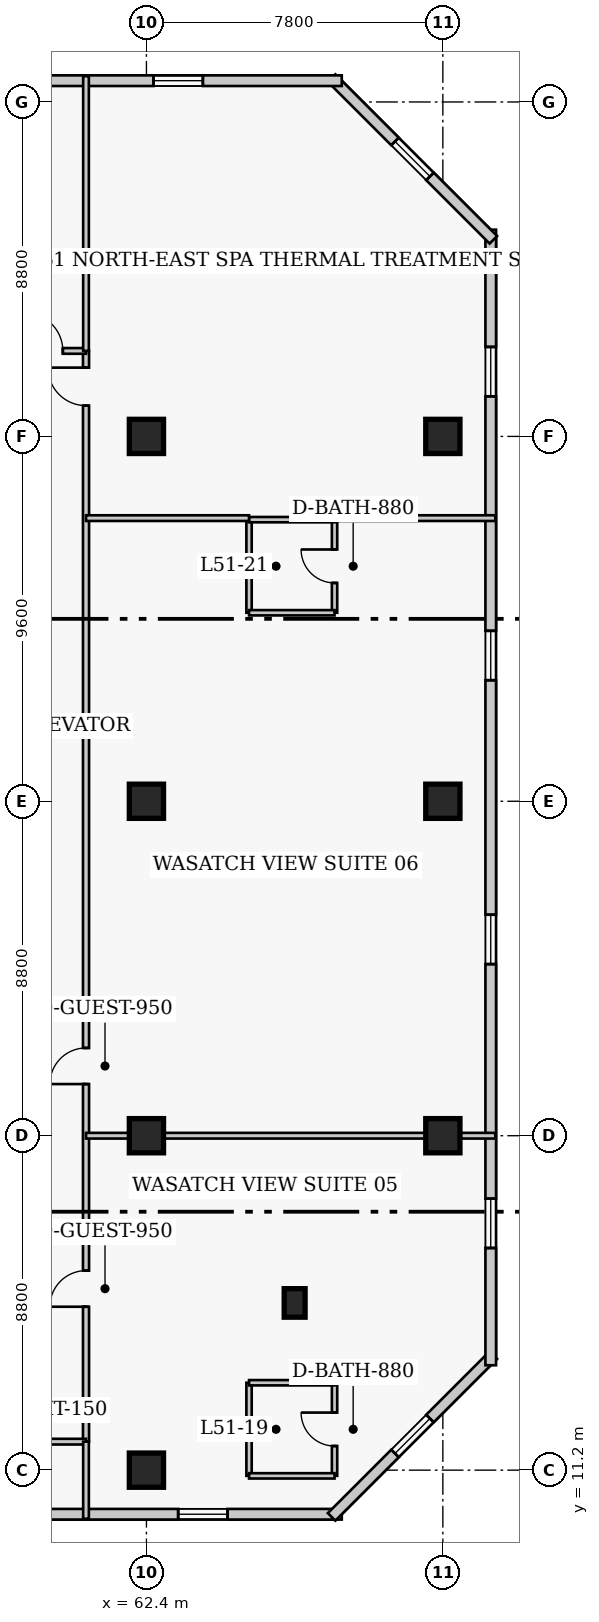
"""IFC4 building model, lengths in metres.
Left out: names, types, materials, properties, quantities, classifications, styles, units other than length and angle.
Written with IfcOpenShell. Run it as: python <this file> out.ifc"""

import sys

from ifc_helpers import new_model, si_unit, direction, frame, frame_2d, origin, origin_2d, place, context, subcontext, project, spatial, rectangle, extrude, element, fill, save


model = new_model("IFC4")
c1 = context("Model", 3, precision=1e-05, world=origin(), true_north=direction((0.0, 1.0)))
c2 = subcontext(c1, "Body", "Model", "MODEL_VIEW")
j1 = project(units=[si_unit("LENGTHUNIT", "METRE"), si_unit("PLANEANGLEUNIT", "RADIAN")], contexts=[c1])
p1 = place(None, origin())
s1 = spatial("IfcSite", under=j1, at=p1, CompositionType="ELEMENT")
p2 = place(p1, origin())
s2 = spatial("IfcBuilding", under=s1, at=p2, CompositionType="ELEMENT")
p3 = place(p2, frame((0.0, 0.0, 204.6)))
s3 = spatial("IfcBuildingStorey", under=s2, at=p3, CompositionType="ELEMENT", Elevation=204.6)
for number, where, z_axis, x_axis in (
    (1, (62.4, 11.2, 0.0), (0.0, 0.0, 1.0), (1.0, 0.0, 0.0)),
    (2, (62.4, 20.0, 0.0), (0.0, 0.0, 1.0), (1.0, 0.0, 0.0)),
    (3, (62.4, 28.8, 0.0), (0.0, 0.0, 1.0), (1.0, 0.0, 0.0)),
    (4, (62.4, 38.4, 0.0), (0.0, 0.0, 1.0), (1.0, 0.0, 0.0)),
    (5, (70.2, 20.0, 0.0), (0.0, 0.0, 1.0), (1.0, 0.0, 0.0)),
    (6, (70.2, 28.8, 0.0), (0.0, 0.0, 1.0), (1.0, 0.0, 0.0)),
    (7, (70.2, 38.4, 0.0), (0.0, 0.0, 1.0), (1.0, 0.0, 0.0)),
):
    element("IfcColumn", number, at=place(p3, frame(where, z_axis=z_axis, x_axis=x_axis)), inside=s3, PredefinedType="COLUMN", context=c2, shape_type="SweptSolid", body=[
        extrude(rectangle(XDim=0.9, YDim=0.9, at=origin_2d()), origin(), (0.0, 0.0, 1.0), 3.9),
    ])
p4 = place(p3, frame((66.3, 15.6, 0.0), z_axis=(0.0, 0.0, 1.0), x_axis=(1.0, 0.0, 0.0)))
e8 = element("IfcColumn", 8, at=p4, inside=s3, PredefinedType="PILASTER", context=c2, shape_type="SweptSolid", body=[
    extrude(rectangle(XDim=0.55, YDim=0.75, at=origin_2d()), origin(), (0.0, 0.0, 1.0), 3.9),
])
p5 = place(p3, frame((41.71, 10.04, 0.0), z_axis=(0.0, 0.0, 1.0), x_axis=(1.0, 0.0, 0.0)))
e9 = element("IfcWall", 9, at=p5, inside=s3, PredefinedType="SOLIDWALL", context=c2, shape_type="SweptSolid", body=[
    extrude(rectangle(XDim=25.83, YDim=0.28, at=frame_2d((12.915, 0.0))), origin(), (0.0, 0.0, 1.0), 3.65),
])
p6 = place(p5, frame((3.005, 0.0, 0.85)))
e10 = element("IfcOpeningElement", 10, at=p6, cuts=e9, PredefinedType="OPENING", context=c2, shape_type="SweptSolid", body=[
    extrude(rectangle(XDim=1.3, YDim=1.7, at=frame_2d((0.65, 0.85))), frame((0.0, 0.15, 0.0), z_axis=(0.0, -1.0, 0.0), x_axis=(1.0, 0.0, 0.0)), (0.0, 0.0, 1.0), 0.3),
])
p7 = place(p5, frame((13.415, 0.0, 0.85)))
e11 = element("IfcOpeningElement", 11, at=p7, cuts=e9, PredefinedType="OPENING", context=c2, shape_type="SweptSolid", body=[
    extrude(rectangle(XDim=1.3, YDim=1.7, at=frame_2d((0.65, 0.85))), frame((0.0, 0.15, 0.0), z_axis=(0.0, -1.0, 0.0), x_axis=(1.0, 0.0, 0.0)), (0.0, 0.0, 1.0), 0.3),
])
p8 = place(p5, frame((21.525, 0.0, 0.85)))
e12 = element("IfcOpeningElement", 12, at=p8, cuts=e9, PredefinedType="OPENING", context=c2, shape_type="SweptSolid", body=[
    extrude(rectangle(XDim=1.3, YDim=1.7, at=frame_2d((0.65, 0.85))), frame((0.0, 0.15, 0.0), z_axis=(0.0, -1.0, 0.0), x_axis=(1.0, 0.0, 0.0)), (0.0, 0.0, 1.0), 0.3),
])
p9 = place(p3, frame((67.273, 9.971, 0.0), z_axis=(0.0, 0.0, 1.0), x_axis=(0.707106781187, 0.707106781187, 0.0)))
e13 = element("IfcWall", 13, at=p9, inside=s3, PredefinedType="SOLIDWALL", context=c2, shape_type="SweptSolid", body=[
    extrude(rectangle(XDim=6.02, YDim=0.28, at=frame_2d((3.01, 0.0))), origin(), (0.0, 0.0, 1.0), 3.65),
])
p10 = place(p9, frame((2.36, 0.0, 0.85)))
e14 = element("IfcOpeningElement", 14, at=p10, cuts=e13, PredefinedType="OPENING", context=c2, shape_type="SweptSolid", body=[
    extrude(rectangle(XDim=1.3, YDim=1.7, at=frame_2d((0.65, 0.85))), frame((0.0, 0.15, 0.0), z_axis=(0.0, -1.0, 0.0), x_axis=(1.0, 0.0, 0.0)), (0.0, 0.0, 1.0), 0.3),
])
p11 = place(p3, frame((71.46, 13.96, 0.0), z_axis=(0.0, 0.0, 1.0), x_axis=(0.0, 1.0, 0.0)))
e15 = element("IfcWall", 15, at=p11, inside=s3, PredefinedType="SOLIDWALL", context=c2, shape_type="SweptSolid", body=[
    extrude(rectangle(XDim=29.88, YDim=0.28, at=frame_2d((14.94, 0.0))), origin(), (0.0, 0.0, 1.0), 3.65),
])
p12 = place(p11, frame((3.085, 0.0, 0.85)))
e16 = element("IfcOpeningElement", 16, at=p12, cuts=e15, PredefinedType="OPENING", context=c2, shape_type="SweptSolid", body=[
    extrude(rectangle(XDim=1.3, YDim=1.7, at=frame_2d((0.65, 0.85))), frame((0.0, 0.15, 0.0), z_axis=(0.0, -1.0, 0.0), x_axis=(1.0, 0.0, 0.0)), (0.0, 0.0, 1.0), 0.3),
])
p13 = place(p11, frame((10.555, 0.0, 0.85)))
e17 = element("IfcOpeningElement", 17, at=p13, cuts=e15, PredefinedType="OPENING", context=c2, shape_type="SweptSolid", body=[
    extrude(rectangle(XDim=1.3, YDim=1.7, at=frame_2d((0.65, 0.85))), frame((0.0, 0.15, 0.0), z_axis=(0.0, -1.0, 0.0), x_axis=(1.0, 0.0, 0.0)), (0.0, 0.0, 1.0), 0.3),
])
p14 = place(p11, frame((18.025, 0.0, 0.85)))
e18 = element("IfcOpeningElement", 18, at=p14, cuts=e15, PredefinedType="OPENING", context=c2, shape_type="SweptSolid", body=[
    extrude(rectangle(XDim=1.3, YDim=1.7, at=frame_2d((0.65, 0.85))), frame((0.0, 0.15, 0.0), z_axis=(0.0, -1.0, 0.0), x_axis=(1.0, 0.0, 0.0)), (0.0, 0.0, 1.0), 0.3),
])
p15 = place(p11, frame((25.495, 0.0, 0.85)))
e19 = element("IfcOpeningElement", 19, at=p15, cuts=e15, PredefinedType="OPENING", context=c2, shape_type="SweptSolid", body=[
    extrude(rectangle(XDim=1.3, YDim=1.7, at=frame_2d((0.65, 0.85))), frame((0.0, 0.15, 0.0), z_axis=(0.0, -1.0, 0.0), x_axis=(1.0, 0.0, 0.0)), (0.0, 0.0, 1.0), 0.3),
])
p16 = place(p3, frame((71.529, 43.573, 0.0), z_axis=(0.0, 0.0, 1.0), x_axis=(-0.707106781187, 0.707106781187, 0.0)))
e20 = element("IfcWall", 20, at=p16, inside=s3, PredefinedType="SOLIDWALL", context=c2, shape_type="SweptSolid", body=[
    extrude(rectangle(XDim=6.02, YDim=0.28, at=frame_2d((3.01, 0.0))), origin(), (0.0, 0.0, 1.0), 3.65),
])
p17 = place(p16, frame((2.36, 0.0, 0.85)))
e21 = element("IfcOpeningElement", 21, at=p17, cuts=e20, PredefinedType="OPENING", context=c2, shape_type="SweptSolid", body=[
    extrude(rectangle(XDim=1.3, YDim=1.7, at=frame_2d((0.65, 0.85))), frame((0.0, 0.15, 0.0), z_axis=(0.0, -1.0, 0.0), x_axis=(1.0, 0.0, 0.0)), (0.0, 0.0, 1.0), 0.3),
])
p18 = place(p3, frame((67.54, 47.76, 0.0), z_axis=(0.0, 0.0, 1.0), x_axis=(-1.0, 0.0, 0.0)))
e22 = element("IfcWall", 22, at=p18, inside=s3, PredefinedType="SOLIDWALL", context=c2, shape_type="SweptSolid", body=[
    extrude(rectangle(XDim=25.83, YDim=0.28, at=frame_2d((12.915, 0.0))), origin(), (0.0, 0.0, 1.0), 3.65),
])
p19 = place(p18, frame((3.655, 0.0, 0.85)))
e23 = element("IfcOpeningElement", 23, at=p19, cuts=e22, PredefinedType="OPENING", context=c2, shape_type="SweptSolid", body=[
    extrude(rectangle(XDim=1.3, YDim=1.7, at=frame_2d((0.65, 0.85))), frame((0.0, 0.15, 0.0), z_axis=(0.0, -1.0, 0.0), x_axis=(1.0, 0.0, 0.0)), (0.0, 0.0, 1.0), 0.3),
])
p20 = place(p18, frame((22.025, 0.0, 0.85)))
e24 = element("IfcOpeningElement", 24, at=p20, cuts=e22, PredefinedType="OPENING", context=c2, shape_type="SweptSolid", body=[
    extrude(rectangle(XDim=1.3, YDim=1.7, at=frame_2d((0.65, 0.85))), frame((0.0, 0.15, 0.0), z_axis=(0.0, -1.0, 0.0), x_axis=(1.0, 0.0, 0.0)), (0.0, 0.0, 1.0), 0.3),
])
p21 = place(p3, frame((60.81, 11.95, 0.0), z_axis=(0.0, 0.0, 1.0), x_axis=(0.0, 1.0, 0.0)))
e25 = element("IfcWall", 25, at=p21, inside=s3, PredefinedType="PARTITIONING", context=c2, shape_type="SweptSolid", body=[
    extrude(rectangle(XDim=28.7, YDim=0.16, at=frame_2d((14.35, 0.0))), origin(), (0.0, 0.0, 1.0), 3.65),
])
p22 = place(p21, frame((3.55, 0.0, 0.0)))
e26 = element("IfcOpeningElement", 26, at=p22, cuts=e25, PredefinedType="OPENING", context=c2, shape_type="SweptSolid", body=[
    extrude(rectangle(XDim=0.95, YDim=2.1, at=frame_2d((0.475, 1.05))), frame((0.0, 0.09, 0.0), z_axis=(0.0, -1.0, 0.0), x_axis=(1.0, 0.0, 0.0)), (0.0, 0.0, 1.0), 0.18),
])
p23 = place(p21, frame((9.409, 0.0, 0.0)))
e27 = element("IfcOpeningElement", 27, at=p23, cuts=e25, PredefinedType="OPENING", context=c2, shape_type="SweptSolid", body=[
    extrude(rectangle(XDim=0.95, YDim=2.1, at=frame_2d((0.475, 1.05))), frame((0.0, 0.09, 0.0), z_axis=(0.0, -1.0, 0.0), x_axis=(1.0, 0.0, 0.0)), (0.0, 0.0, 1.0), 0.18),
])
p24 = place(p21, frame((27.26, 0.0, 0.0)))
e28 = element("IfcOpeningElement", 28, at=p24, cuts=e25, PredefinedType="OPENING", context=c2, shape_type="SweptSolid", body=[
    extrude(rectangle(XDim=1.0, YDim=2.15, at=frame_2d((0.5, 1.075))), frame((0.0, 0.09, 0.0), z_axis=(0.0, -1.0, 0.0), x_axis=(1.0, 0.0, 0.0)), (0.0, 0.0, 1.0), 0.18),
])
p25 = place(p3, frame((58.59, 11.95, 0.0), z_axis=(0.0, 0.0, 1.0), x_axis=(1.0, 0.0, 0.0)))
e29 = element("IfcWall", 29, at=p25, inside=s3, PredefinedType="PARTITIONING", context=c2, shape_type="SweptSolid", body=[
    extrude(rectangle(XDim=2.22, YDim=0.15, at=frame_2d((1.11, 0.0))), origin(), (0.0, 0.0, 1.0), 3.65),
])
p26 = place(p3, frame((56.8, 40.65, 0.0), z_axis=(0.0, 0.0, 1.0), x_axis=(1.0, 0.0, 0.0)))
e30 = element("IfcWall", 30, at=p26, inside=s3, PredefinedType="PARTITIONING", context=c2, shape_type="SweptSolid", body=[
    extrude(rectangle(XDim=4.01, YDim=0.15, at=frame_2d((2.005, 0.0))), origin(), (0.0, 0.0, 1.0), 3.65),
])
p27 = place(p26, frame((2.4, 0.0, 0.0)))
e31 = element("IfcOpeningElement", 31, at=p27, cuts=e30, PredefinedType="OPENING", context=c2, shape_type="SweptSolid", body=[
    extrude(rectangle(XDim=1.0, YDim=2.15, at=frame_2d((0.5, 1.075))), frame((0.0, 0.085, 0.0), z_axis=(0.0, -1.0, 0.0), x_axis=(1.0, 0.0, 0.0)), (0.0, 0.0, 1.0), 0.17),
])
p28 = place(p3, frame((60.81, 40.65, 0.0), z_axis=(0.0, 0.0, 1.0), x_axis=(0.0, 1.0, 0.0)))
e32 = element("IfcWall", 32, at=p28, inside=s3, PredefinedType="PARTITIONING", context=c2, shape_type="SweptSolid", body=[
    extrude(rectangle(XDim=7.23, YDim=0.15, at=frame_2d((3.615, 0.0))), origin(), (0.0, 0.0, 1.0), 3.65),
])
p29 = place(p3, frame((60.81, 9.92, 0.0), z_axis=(0.0, 0.0, 1.0), x_axis=(0.0, 1.0, 0.0)))
e33 = element("IfcWall", 33, at=p29, inside=s3, PredefinedType="PARTITIONING", context=c2, shape_type="SweptSolid", body=[
    extrude(rectangle(XDim=2.03, YDim=0.15, at=frame_2d((1.015, 0.0))), origin(), (0.0, 0.0, 1.0), 3.65),
])
p30 = place(p3, frame((65.1, 11.05, 0.0), z_axis=(0.0, 0.0, 1.0), x_axis=(0.0, 1.0, 0.0)))
e34 = element("IfcWall", 34, at=p30, inside=s3, PredefinedType="PLUMBINGWALL", context=c2, shape_type="SweptSolid", body=[
    extrude(rectangle(XDim=2.45, YDim=0.14, at=frame_2d((1.225, 0.0))), origin(), (0.0, 0.0, 1.0), 3.65),
])
p31 = place(p3, frame((67.35, 11.05, 0.0), z_axis=(0.0, 0.0, 1.0), x_axis=(0.0, 1.0, 0.0)))
e35 = element("IfcWall", 35, at=p31, inside=s3, PredefinedType="PLUMBINGWALL", context=c2, shape_type="SweptSolid", body=[
    extrude(rectangle(XDim=2.45, YDim=0.14, at=frame_2d((1.225, 0.0))), origin(), (0.0, 0.0, 1.0), 3.65),
])
p32 = place(p31, frame((0.785, 0.0, 0.0)))
e36 = element("IfcOpeningElement", 36, at=p32, cuts=e35, PredefinedType="OPENING", context=c2, shape_type="SweptSolid", body=[
    extrude(rectangle(XDim=0.88, YDim=2.05, at=frame_2d((0.44, 1.025))), frame((0.0, 0.08, 0.0), z_axis=(0.0, -1.0, 0.0), x_axis=(1.0, 0.0, 0.0)), (0.0, 0.0, 1.0), 0.16),
])
for number, where, z_axis, x_axis in (
    (37, (65.1, 11.05, 0.0), (0.0, 0.0, 1.0), (1.0, 0.0, 0.0)),
    (38, (65.1, 13.5, 0.0), (0.0, 0.0, 1.0), (1.0, 0.0, 0.0)),
):
    element("IfcWall", number, at=place(p3, frame(where, z_axis=z_axis, x_axis=x_axis)), inside=s3, PredefinedType="PLUMBINGWALL", context=c2, shape_type="SweptSolid", body=[
        extrude(rectangle(XDim=2.25, YDim=0.14, at=frame_2d((1.125, 0.0))), origin(), (0.0, 0.0, 1.0), 3.65),
    ])
p33 = place(p3, frame((60.81, 20.0, 0.0), z_axis=(0.0, 0.0, 1.0), x_axis=(1.0, 0.0, 0.0)))
e39 = element("IfcWall", 39, at=p33, inside=s3, PredefinedType="PARTITIONING", context=c2, shape_type="SweptSolid", body=[
    extrude(rectangle(XDim=10.77, YDim=0.15, at=frame_2d((5.385, 0.0))), origin(), (0.0, 0.0, 1.0), 2.878),
])
p34 = place(p3, frame((65.1, 33.76, 0.0), z_axis=(0.0, 0.0, 1.0), x_axis=(0.0, 1.0, 0.0)))
e40 = element("IfcWall", 40, at=p34, inside=s3, PredefinedType="PLUMBINGWALL", context=c2, shape_type="SweptSolid", body=[
    extrude(rectangle(XDim=2.45, YDim=0.14, at=frame_2d((1.225, 0.0))), origin(), (0.0, 0.0, 1.0), 3.65),
])
p35 = place(p3, frame((67.35, 33.76, 0.0), z_axis=(0.0, 0.0, 1.0), x_axis=(0.0, 1.0, 0.0)))
e41 = element("IfcWall", 41, at=p35, inside=s3, PredefinedType="PLUMBINGWALL", context=c2, shape_type="SweptSolid", body=[
    extrude(rectangle(XDim=2.45, YDim=0.14, at=frame_2d((1.225, 0.0))), origin(), (0.0, 0.0, 1.0), 3.65),
])
p36 = place(p35, frame((0.785, 0.0, 0.0)))
e42 = element("IfcOpeningElement", 42, at=p36, cuts=e41, PredefinedType="OPENING", context=c2, shape_type="SweptSolid", body=[
    extrude(rectangle(XDim=0.88, YDim=2.05, at=frame_2d((0.44, 1.025))), frame((0.0, 0.08, 0.0), z_axis=(0.0, -1.0, 0.0), x_axis=(1.0, 0.0, 0.0)), (0.0, 0.0, 1.0), 0.16),
])
for number, where, z_axis, x_axis in (
    (43, (65.1, 33.76, 0.0), (0.0, 0.0, 1.0), (1.0, 0.0, 0.0)),
    (44, (65.1, 36.21, 0.0), (0.0, 0.0, 1.0), (1.0, 0.0, 0.0)),
):
    element("IfcWall", number, at=place(p3, frame(where, z_axis=z_axis, x_axis=x_axis)), inside=s3, PredefinedType="PLUMBINGWALL", context=c2, shape_type="SweptSolid", body=[
        extrude(rectangle(XDim=2.25, YDim=0.14, at=frame_2d((1.125, 0.0))), origin(), (0.0, 0.0, 1.0), 3.65),
    ])
p37 = place(p3, frame((60.81, 36.25, 0.0), z_axis=(0.0, 0.0, 1.0), x_axis=(1.0, 0.0, 0.0)))
e45 = element("IfcWall", 45, at=p37, inside=s3, PredefinedType="PARTITIONING", context=c2, shape_type="SweptSolid", body=[
    extrude(rectangle(XDim=4.29, YDim=0.15, at=frame_2d((2.145, 0.0))), origin(), (0.0, 0.0, 1.0), 3.65),
])
p38 = place(p3, frame((67.35, 36.25, 0.0), z_axis=(0.0, 0.0, 1.0), x_axis=(1.0, 0.0, 0.0)))
e46 = element("IfcWall", 46, at=p38, inside=s3, PredefinedType="PARTITIONING", context=c2, shape_type="SweptSolid", body=[
    extrude(rectangle(XDim=4.23, YDim=0.15, at=frame_2d((2.115, 0.0))), origin(), (0.0, 0.0, 1.0), 3.65),
])
p39 = place(p8, origin())
e47 = element("IfcWindow", 47, at=p39, inside=s3, PartitioningType="SINGLE_PANEL", PredefinedType="WINDOW", context=c2, shape_type="SweptSolid", body=[
    extrude(rectangle(XDim=1.3, YDim=1.7, at=frame_2d((0.65, 0.85))), frame((0.0, 0.03, 0.0), z_axis=(0.0, -1.0, 0.0), x_axis=(1.0, 0.0, 0.0)), (0.0, 0.0, 1.0), 0.06),
])
fill(e12, e47)
p40 = place(p10, origin())
e48 = element("IfcWindow", 48, at=p40, inside=s3, PartitioningType="SINGLE_PANEL", PredefinedType="WINDOW", context=c2, shape_type="SweptSolid", body=[
    extrude(rectangle(XDim=1.3, YDim=1.7, at=frame_2d((0.65, 0.85))), frame((0.0, 0.03, 0.0), z_axis=(0.0, -1.0, 0.0), x_axis=(1.0, 0.0, 0.0)), (0.0, 0.0, 1.0), 0.06),
])
fill(e14, e48)
p41 = place(p12, origin())
e49 = element("IfcWindow", 49, at=p41, inside=s3, PartitioningType="SINGLE_PANEL", PredefinedType="WINDOW", context=c2, shape_type="SweptSolid", body=[
    extrude(rectangle(XDim=1.3, YDim=1.7, at=frame_2d((0.65, 0.85))), frame((0.0, 0.03, 0.0), z_axis=(0.0, -1.0, 0.0), x_axis=(1.0, 0.0, 0.0)), (0.0, 0.0, 1.0), 0.06),
])
fill(e16, e49)
p42 = place(p13, origin())
e50 = element("IfcWindow", 50, at=p42, inside=s3, PartitioningType="SINGLE_PANEL", PredefinedType="WINDOW", context=c2, shape_type="SweptSolid", body=[
    extrude(rectangle(XDim=1.3, YDim=1.7, at=frame_2d((0.65, 0.85))), frame((0.0, 0.03, 0.0), z_axis=(0.0, -1.0, 0.0), x_axis=(1.0, 0.0, 0.0)), (0.0, 0.0, 1.0), 0.06),
])
fill(e17, e50)
p43 = place(p14, origin())
e51 = element("IfcWindow", 51, at=p43, inside=s3, PartitioningType="SINGLE_PANEL", PredefinedType="WINDOW", context=c2, shape_type="SweptSolid", body=[
    extrude(rectangle(XDim=1.3, YDim=1.7, at=frame_2d((0.65, 0.85))), frame((0.0, 0.03, 0.0), z_axis=(0.0, -1.0, 0.0), x_axis=(1.0, 0.0, 0.0)), (0.0, 0.0, 1.0), 0.06),
])
fill(e18, e51)
p44 = place(p15, origin())
e52 = element("IfcWindow", 52, at=p44, inside=s3, PartitioningType="SINGLE_PANEL", PredefinedType="WINDOW", context=c2, shape_type="SweptSolid", body=[
    extrude(rectangle(XDim=1.3, YDim=1.7, at=frame_2d((0.65, 0.85))), frame((0.0, 0.03, 0.0), z_axis=(0.0, -1.0, 0.0), x_axis=(1.0, 0.0, 0.0)), (0.0, 0.0, 1.0), 0.06),
])
fill(e19, e52)
p45 = place(p17, origin())
e53 = element("IfcWindow", 53, at=p45, inside=s3, PartitioningType="SINGLE_PANEL", PredefinedType="WINDOW", context=c2, shape_type="SweptSolid", body=[
    extrude(rectangle(XDim=1.3, YDim=1.7, at=frame_2d((0.65, 0.85))), frame((0.0, 0.03, 0.0), z_axis=(0.0, -1.0, 0.0), x_axis=(1.0, 0.0, 0.0)), (0.0, 0.0, 1.0), 0.06),
])
fill(e21, e53)
p46 = place(p19, origin())
e54 = element("IfcWindow", 54, at=p46, inside=s3, PartitioningType="SINGLE_PANEL", PredefinedType="WINDOW", context=c2, shape_type="SweptSolid", body=[
    extrude(rectangle(XDim=1.3, YDim=1.7, at=frame_2d((0.65, 0.85))), frame((0.0, 0.03, 0.0), z_axis=(0.0, -1.0, 0.0), x_axis=(1.0, 0.0, 0.0)), (0.0, 0.0, 1.0), 0.06),
])
fill(e23, e54)
p47 = place(p27, origin())
e55 = element("IfcDoor", 55, at=p47, inside=s3, OperationType="SINGLE_SWING_LEFT", PredefinedType="DOOR", context=c2, shape_type="SweptSolid", body=[
    extrude(rectangle(XDim=1.0, YDim=2.15, at=frame_2d((0.5, 1.075))), frame((0.0, 0.025, 0.0), z_axis=(0.0, -1.0, 0.0), x_axis=(1.0, 0.0, 0.0)), (0.0, 0.0, 1.0), 0.05),
])
fill(e31, e55)
p48 = place(p32, origin())
e56 = element("IfcDoor", 56, at=p48, inside=s3, OperationType="SINGLE_SWING_RIGHT", PredefinedType="DOOR", context=c2, shape_type="SweptSolid", body=[
    extrude(rectangle(XDim=0.88, YDim=2.05, at=frame_2d((0.44, 1.025))), frame((0.0, 0.025, 0.0), z_axis=(0.0, -1.0, 0.0), x_axis=(1.0, 0.0, 0.0)), (0.0, 0.0, 1.0), 0.05),
])
fill(e36, e56)
p49 = place(p22, origin())
e57 = element("IfcDoor", 57, at=p49, inside=s3, OperationType="SINGLE_SWING_LEFT", PredefinedType="DOOR", context=c2, shape_type="SweptSolid", body=[
    extrude(rectangle(XDim=0.95, YDim=2.1, at=frame_2d((0.475, 1.05))), frame((0.0, 0.025, 0.0), z_axis=(0.0, -1.0, 0.0), x_axis=(1.0, 0.0, 0.0)), (0.0, 0.0, 1.0), 0.05),
])
fill(e26, e57)
p50 = place(p36, origin())
e58 = element("IfcDoor", 58, at=p50, inside=s3, OperationType="SINGLE_SWING_RIGHT", PredefinedType="DOOR", context=c2, shape_type="SweptSolid", body=[
    extrude(rectangle(XDim=0.88, YDim=2.05, at=frame_2d((0.44, 1.025))), frame((0.0, 0.025, 0.0), z_axis=(0.0, -1.0, 0.0), x_axis=(1.0, 0.0, 0.0)), (0.0, 0.0, 1.0), 0.05),
])
fill(e42, e58)
p51 = place(p23, origin())
e59 = element("IfcDoor", 59, at=p51, inside=s3, OperationType="SINGLE_SWING_LEFT", PredefinedType="DOOR", context=c2, shape_type="SweptSolid", body=[
    extrude(rectangle(XDim=0.95, YDim=2.1, at=frame_2d((0.475, 1.05))), frame((0.0, 0.025, 0.0), z_axis=(0.0, -1.0, 0.0), x_axis=(1.0, 0.0, 0.0)), (0.0, 0.0, 1.0), 0.05),
])
fill(e27, e59)
p52 = place(p24, origin())
e60 = element("IfcDoor", 60, at=p52, inside=s3, OperationType="SINGLE_SWING_RIGHT", PredefinedType="DOOR", context=c2, shape_type="SweptSolid", body=[
    extrude(rectangle(XDim=1.0, YDim=2.15, at=frame_2d((0.5, 1.075))), frame((0.0, 0.025, 0.0), z_axis=(0.0, -1.0, 0.0), x_axis=(1.0, 0.0, 0.0)), (0.0, 0.0, 1.0), 0.05),
])
fill(e28, e60)
save(model, sys.argv[1])
